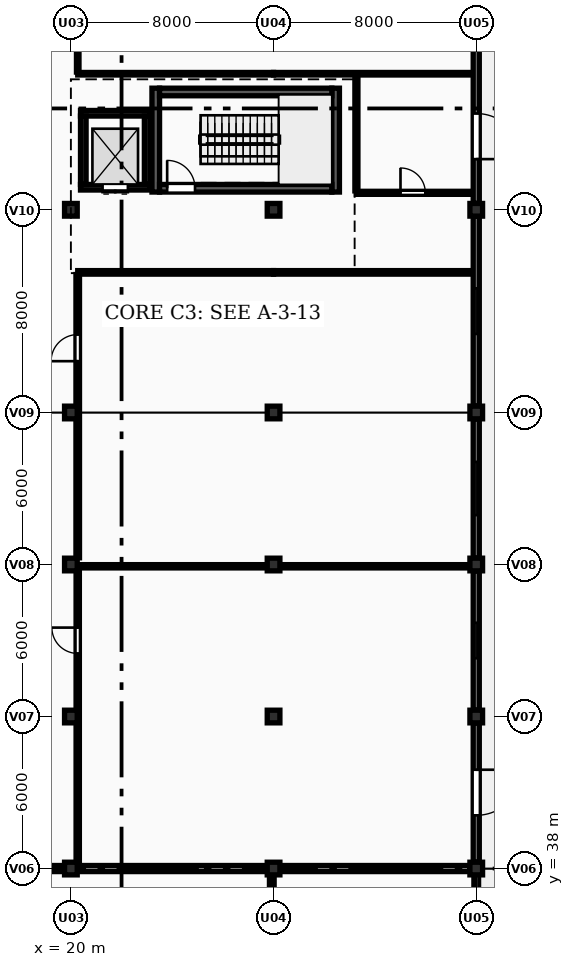
"""IFC4 building model, lengths in metres.
Left out: names, types, materials, properties, quantities, classifications, styles, units other than length and angle.
Written with IfcOpenShell. Run it as: python <this file> out.ifc"""

import sys

from ifc_helpers import new_model, si_unit, direction, frame, frame_2d, origin, origin_2d, place, context, subcontext, project, spatial, rectangle, extrude, element, fill, save


model = new_model("IFC4")
c1 = context("Model", 3, precision=1e-05, world=origin(), true_north=direction((0.0, 1.0)))
c2 = subcontext(c1, "Body", "Model", "MODEL_VIEW")
j1 = project(units=[si_unit("LENGTHUNIT", "METRE"), si_unit("PLANEANGLEUNIT", "RADIAN")], contexts=[c1])
p1 = place(None, origin())
s1 = spatial("IfcSite", under=j1, at=p1, CompositionType="ELEMENT")
p2 = place(p1, origin())
s2 = spatial("IfcBuilding", under=s1, at=p2, CompositionType="ELEMENT")
p3 = place(p2, origin())
s3 = spatial("IfcBuildingStorey", under=s2, at=p3, CompositionType="ELEMENT", Elevation=0.0)
for number, where, z_axis, x_axis in (
    (1, (20.0, 38.0, -0.2), (0.0, 0.0, 1.0), (1.0, 0.0, 0.0)),
    (2, (20.0, 44.0, -0.2), (0.0, 0.0, 1.0), (1.0, 0.0, 0.0)),
    (3, (20.0, 50.0, -0.2), (0.0, 0.0, 1.0), (1.0, 0.0, 0.0)),
    (4, (20.0, 56.0, -0.2), (0.0, 0.0, 1.0), (1.0, 0.0, 0.0)),
    (5, (20.0, 64.0, -0.2), (0.0, 0.0, 1.0), (1.0, 0.0, 0.0)),
    (6, (28.0, 38.0, -0.2), (0.0, 0.0, 1.0), (1.0, 0.0, 0.0)),
    (7, (28.0, 44.0, -0.2), (0.0, 0.0, 1.0), (1.0, 0.0, 0.0)),
    (8, (28.0, 50.0, -0.2), (0.0, 0.0, 1.0), (1.0, 0.0, 0.0)),
    (9, (28.0, 56.0, -0.2), (0.0, 0.0, 1.0), (1.0, 0.0, 0.0)),
    (10, (28.0, 64.0, -0.2), (0.0, 0.0, 1.0), (1.0, 0.0, 0.0)),
    (11, (36.0, 38.0, -0.2), (0.0, 0.0, 1.0), (1.0, 0.0, 0.0)),
    (12, (36.0, 44.0, -0.2), (0.0, 0.0, 1.0), (1.0, 0.0, 0.0)),
    (13, (36.0, 50.0, -0.2), (0.0, 0.0, 1.0), (1.0, 0.0, 0.0)),
    (14, (36.0, 56.0, -0.2), (0.0, 0.0, 1.0), (1.0, 0.0, 0.0)),
    (15, (36.0, 64.0, -0.2), (0.0, 0.0, 1.0), (1.0, 0.0, 0.0)),
):
    element("IfcColumn", number, at=place(p3, frame(where, z_axis=z_axis, x_axis=x_axis)), inside=s3, PredefinedType="COLUMN", context=c2, shape_type="SweptSolid", body=[
        extrude(rectangle(XDim=0.5, YDim=0.5, at=origin_2d()), origin(), (0.0, 0.0, 1.0), 4.7),
    ])
p4 = place(p3, frame((36.0, 71.75, 0.0), z_axis=(0.0, 0.0, 1.0), x_axis=(0.0, -1.0, 0.0)))
e16 = element("IfcWall", 16, at=p4, inside=s3, PredefinedType="SOLIDWALL", context=c2, shape_type="SweptSolid", body=[
    extrude(rectangle(XDim=7.5, YDim=0.24, at=frame_2d((3.75, 0.0))), origin(), (0.0, 0.0, 1.0), 3.59),
])
p5 = place(p4, frame((3.95, 0.0, 0.0)))
e17 = element("IfcOpeningElement", 17, at=p5, cuts=e16, PredefinedType="OPENING", context=c2, shape_type="SweptSolid", body=[
    extrude(rectangle(XDim=1.8, YDim=2.2, at=frame_2d((0.9, 1.1))), frame((0.0, 0.13, 0.0), z_axis=(0.0, -1.0, 0.0), x_axis=(1.0, 0.0, 0.0)), (0.0, 0.0, 1.0), 0.26),
])
p6 = place(p3, frame((36.0, 63.75, 0.0), z_axis=(0.0, 0.0, 1.0), x_axis=(0.0, -1.0, 0.0)))
e18 = element("IfcWall", 18, at=p6, inside=s3, PredefinedType="SOLIDWALL", context=c2, shape_type="SweptSolid", body=[
    extrude(rectangle(XDim=7.5, YDim=0.24, at=frame_2d((3.75, 0.0))), origin(), (0.0, 0.0, 1.0), 3.59),
])
p7 = place(p6, frame((2.85, 0.0, 0.95)))
e19 = element("IfcOpeningElement", 19, at=p7, cuts=e18, PredefinedType="OPENING", context=c2, shape_type="SweptSolid", body=[
    extrude(rectangle(XDim=1.8, YDim=1.2, at=frame_2d((0.9, 0.6))), frame((0.0, 0.13, 0.0), z_axis=(0.0, -1.0, 0.0), x_axis=(1.0, 0.0, 0.0)), (0.0, 0.0, 1.0), 0.26),
])
p8 = place(p3, frame((36.0, 55.75, 0.0), z_axis=(0.0, 0.0, 1.0), x_axis=(0.0, -1.0, 0.0)))
e20 = element("IfcWall", 20, at=p8, inside=s3, PredefinedType="SOLIDWALL", context=c2, shape_type="SweptSolid", body=[
    extrude(rectangle(XDim=5.5, YDim=0.24, at=frame_2d((2.75, 0.0))), origin(), (0.0, 0.0, 1.0), 3.59),
])
p9 = place(p8, frame((1.7, 0.0, 0.95)))
e21 = element("IfcOpeningElement", 21, at=p9, cuts=e20, PredefinedType="OPENING", context=c2, shape_type="SweptSolid", body=[
    extrude(rectangle(XDim=2.1, YDim=1.2, at=frame_2d((1.05, 0.6))), frame((0.0, 0.13, 0.0), z_axis=(0.0, -1.0, 0.0), x_axis=(1.0, 0.0, 0.0)), (0.0, 0.0, 1.0), 0.26),
])
p10 = place(p3, frame((36.0, 49.75, 0.0), z_axis=(0.0, 0.0, 1.0), x_axis=(0.0, -1.0, 0.0)))
e22 = element("IfcWall", 22, at=p10, inside=s3, PredefinedType="SOLIDWALL", context=c2, shape_type="SweptSolid", body=[
    extrude(rectangle(XDim=5.5, YDim=0.24, at=frame_2d((2.75, 0.0))), origin(), (0.0, 0.0, 1.0), 3.59),
])
p11 = place(p10, frame((2.05, 0.0, 0.95)))
e23 = element("IfcOpeningElement", 23, at=p11, cuts=e22, PredefinedType="OPENING", context=c2, shape_type="SweptSolid", body=[
    extrude(rectangle(XDim=1.4, YDim=1.8, at=frame_2d((0.7, 0.9))), frame((0.0, 0.13, 0.0), z_axis=(0.0, -1.0, 0.0), x_axis=(1.0, 0.0, 0.0)), (0.0, 0.0, 1.0), 0.26),
])
p12 = place(p3, frame((36.0, 43.75, 0.0), z_axis=(0.0, 0.0, 1.0), x_axis=(0.0, -1.0, 0.0)))
e24 = element("IfcWall", 24, at=p12, inside=s3, PredefinedType="SOLIDWALL", context=c2, shape_type="SweptSolid", body=[
    extrude(rectangle(XDim=5.5, YDim=0.24, at=frame_2d((2.75, 0.0))), origin(), (0.0, 0.0, 1.0), 3.59),
])
p13 = place(p12, frame((1.85, 0.0, 0.0)))
e25 = element("IfcOpeningElement", 25, at=p13, cuts=e24, PredefinedType="OPENING", context=c2, shape_type="SweptSolid", body=[
    extrude(rectangle(XDim=1.8, YDim=2.2, at=frame_2d((0.9, 1.1))), frame((0.0, 0.13, 0.0), z_axis=(0.0, -1.0, 0.0), x_axis=(1.0, 0.0, 0.0)), (0.0, 0.0, 1.0), 0.26),
])
p14 = place(p3, frame((35.75, 38.0, 0.0), z_axis=(0.0, 0.0, 1.0), x_axis=(-1.0, 0.0, 0.0)))
e26 = element("IfcWall", 26, at=p14, inside=s3, PredefinedType="SOLIDWALL", context=c2, shape_type="SweptSolid", body=[
    extrude(rectangle(XDim=7.5, YDim=0.24, at=frame_2d((3.75, 0.0))), origin(), (0.0, 0.0, 1.0), 3.59),
])
p15 = place(p14, frame((2.9, 0.0, 0.95)))
e27 = element("IfcOpeningElement", 27, at=p15, cuts=e26, PredefinedType="OPENING", context=c2, shape_type="SweptSolid", body=[
    extrude(rectangle(XDim=1.7, YDim=1.8, at=frame_2d((0.85, 0.9))), frame((0.0, 0.13, 0.0), z_axis=(0.0, -1.0, 0.0), x_axis=(1.0, 0.0, 0.0)), (0.0, 0.0, 1.0), 0.26),
])
p16 = place(p3, frame((27.75, 38.0, 0.0), z_axis=(0.0, 0.0, 1.0), x_axis=(-1.0, 0.0, 0.0)))
e28 = element("IfcWall", 28, at=p16, inside=s3, PredefinedType="SOLIDWALL", context=c2, shape_type="SweptSolid", body=[
    extrude(rectangle(XDim=7.5, YDim=0.24, at=frame_2d((3.75, 0.0))), origin(), (0.0, 0.0, 1.0), 3.59),
])
p17 = place(p16, frame((2.75, 0.0, 0.95)))
e29 = element("IfcOpeningElement", 29, at=p17, cuts=e28, PredefinedType="OPENING", context=c2, shape_type="SweptSolid", body=[
    extrude(rectangle(XDim=2.0, YDim=1.8, at=frame_2d((1.0, 0.9))), frame((0.0, 0.13, 0.0), z_axis=(0.0, -1.0, 0.0), x_axis=(1.0, 0.0, 0.0)), (0.0, 0.0, 1.0), 0.26),
])
p18 = place(p3, frame((19.75, 38.0, 0.0), z_axis=(0.0, 0.0, 1.0), x_axis=(-1.0, 0.0, 0.0)))
e30 = element("IfcWall", 30, at=p18, inside=s3, PredefinedType="SOLIDWALL", context=c2, shape_type="SweptSolid", body=[
    extrude(rectangle(XDim=7.5, YDim=0.24, at=frame_2d((3.75, 0.0))), origin(), (0.0, 0.0, 1.0), 3.59),
])
p19 = place(p3, frame((36.0, 37.75, 0.0), z_axis=(0.0, 0.0, 1.0), x_axis=(0.0, -1.0, 0.0)))
e31 = element("IfcWall", 31, at=p19, inside=s3, PredefinedType="SOLIDWALL", context=c2, shape_type="SweptSolid", body=[
    extrude(rectangle(XDim=5.5, YDim=0.185, at=frame_2d((2.75, 0.0))), origin(), (0.0, 0.0, 1.0), 0.95),
])
for number, where, z_axis, x_axis in (
    (32, (23.35, 64.7, 0.0), (0.0, 0.0, 1.0), (0.0, 1.0, 0.0)),
    (33, (30.45, 68.8, 0.0), (0.0, 0.0, 1.0), (0.0, -1.0, 0.0)),
):
    element("IfcWall", number, at=place(p3, frame(where, z_axis=z_axis, x_axis=x_axis)), inside=s3, PredefinedType="SHEAR", context=c2, shape_type="SweptSolid", body=[
        extrude(rectangle(XDim=4.1, YDim=0.3, at=frame_2d((2.05, 0.0))), origin(), (0.0, 0.0, 1.0), 4.24),
    ])
p20 = place(p3, frame((23.5, 64.85, 0.0), z_axis=(0.0, 0.0, 1.0), x_axis=(1.0, 0.0, 0.0)))
e34 = element("IfcWall", 34, at=p20, inside=s3, PredefinedType="SHEAR", context=c2, shape_type="SweptSolid", body=[
    extrude(rectangle(XDim=6.8, YDim=0.3, at=frame_2d((3.4, 0.0))), origin(), (0.0, 0.0, 1.0), 4.24),
])
p21 = place(p20, frame((0.3, 0.0, 0.0)))
e35 = element("IfcOpeningElement", 35, at=p21, cuts=e34, PredefinedType="OPENING", context=c2, shape_type="SweptSolid", body=[
    extrude(rectangle(XDim=1.1, YDim=2.15, at=frame_2d((0.55, 1.075))), frame((0.0, 0.16, 0.0), z_axis=(0.0, -1.0, 0.0), x_axis=(1.0, 0.0, 0.0)), (0.0, 0.0, 1.0), 0.32),
])
p22 = place(p3, frame((30.3, 68.65, 0.0), z_axis=(0.0, 0.0, 1.0), x_axis=(-1.0, 0.0, 0.0)))
e36 = element("IfcWall", 36, at=p22, inside=s3, PredefinedType="SHEAR", context=c2, shape_type="SweptSolid", body=[
    extrude(rectangle(XDim=6.8, YDim=0.3, at=frame_2d((3.4, 0.0))), origin(), (0.0, 0.0, 1.0), 4.24),
])
p23 = place(p3, frame((23.12, 64.89, 0.0), z_axis=(0.0, 0.0, 1.0), x_axis=(-1.0, 0.0, 0.0)))
e37 = element("IfcWall", 37, at=p23, inside=s3, PredefinedType="SHEAR", context=c2, shape_type="SweptSolid", body=[
    extrude(rectangle(XDim=2.74, YDim=0.22, at=frame_2d((1.37, 0.0))), origin(), (0.0, 0.0, 1.0), 4.24),
])
p24 = place(p23, frame((0.87, 0.0, 0.0)))
e38 = element("IfcOpeningElement", 38, at=p24, cuts=e37, PredefinedType="OPENING", context=c2, shape_type="SweptSolid", body=[
    extrude(rectangle(XDim=1.0, YDim=2.15, at=frame_2d((0.5, 1.075))), frame((0.0, 0.12, 0.0), z_axis=(0.0, -1.0, 0.0), x_axis=(1.0, 0.0, 0.0)), (0.0, 0.0, 1.0), 0.24),
])
p25 = place(p3, frame((20.38, 67.81, 0.0), z_axis=(0.0, 0.0, 1.0), x_axis=(1.0, 0.0, 0.0)))
e39 = element("IfcWall", 39, at=p25, inside=s3, PredefinedType="SHEAR", context=c2, shape_type="SweptSolid", body=[
    extrude(rectangle(XDim=2.74, YDim=0.22, at=frame_2d((1.37, 0.0))), origin(), (0.0, 0.0, 1.0), 4.24),
])
for number, where, z_axis, x_axis in (
    (40, (20.49, 65.0, 0.0), (0.0, 0.0, 1.0), (0.0, 1.0, 0.0)),
    (41, (23.01, 67.7, 0.0), (0.0, 0.0, 1.0), (0.0, -1.0, 0.0)),
):
    element("IfcWall", number, at=place(p3, frame(where, z_axis=z_axis, x_axis=x_axis)), inside=s3, PredefinedType="SHEAR", context=c2, shape_type="SweptSolid", body=[
        extrude(rectangle(XDim=2.7, YDim=0.22, at=frame_2d((1.35, 0.0))), origin(), (0.0, 0.0, 1.0), 4.24),
    ])
p26 = place(p3, frame((20.27, 69.37, 0.0), z_axis=(0.0, 0.0, 1.0), x_axis=(1.0, 0.0, 0.0)))
e42 = element("IfcWall", 42, at=p26, inside=s3, PredefinedType="PARTITIONING", context=c2, shape_type="SweptSolid", body=[
    extrude(rectangle(XDim=7.73, YDim=0.1, at=frame_2d((3.865, 0.0))), origin(), (0.0, 0.0, 1.0), 4.24),
])
p27 = place(p3, frame((28.0, 69.37, 0.0), z_axis=(0.0, 0.0, 1.0), x_axis=(1.0, 0.0, 0.0)))
e43 = element("IfcWall", 43, at=p27, inside=s3, PredefinedType="PARTITIONING", context=c2, shape_type="SweptSolid", body=[
    extrude(rectangle(XDim=7.838, YDim=0.1, at=frame_2d((3.919, 0.0))), origin(), (0.0, 0.0, 1.0), 4.24),
])
p28 = place(p3, frame((20.27, 69.435, 0.0), z_axis=(0.0, 0.0, 1.0), x_axis=(0.0, 1.0, 0.0)))
e44 = element("IfcWall", 44, at=p28, inside=s3, PredefinedType="PARTITIONING", context=c2, shape_type="SweptSolid", body=[
    extrude(rectangle(XDim=2.3, YDim=0.1, at=frame_2d((1.15, 0.0))), origin(), (0.0, 0.0, 1.0), 3.59),
])
p29 = place(p3, frame((31.27, 64.67, 0.0), z_axis=(0.0, 0.0, 1.0), x_axis=(1.0, 0.0, 0.0)))
e45 = element("IfcWall", 45, at=p29, inside=s3, PredefinedType="PARTITIONING", context=c2, shape_type="SweptSolid", body=[
    extrude(rectangle(XDim=4.568, YDim=0.12, at=frame_2d((2.284, 0.0))), origin(), (0.0, 0.0, 1.0), 4.24),
])
p30 = place(p29, frame((1.74, 0.0, 0.0)))
e46 = element("IfcOpeningElement", 46, at=p30, cuts=e45, PredefinedType="OPENING", context=c2, shape_type="SweptSolid", body=[
    extrude(rectangle(XDim=0.98, YDim=2.1, at=frame_2d((0.49, 1.05))), frame((0.0, 0.07, 0.0), z_axis=(0.0, -1.0, 0.0), x_axis=(1.0, 0.0, 0.0)), (0.0, 0.0, 1.0), 0.14),
])
p31 = place(p3, frame((31.27, 64.745, 0.0), z_axis=(0.0, 0.0, 1.0), x_axis=(0.0, 1.0, 0.0)))
e47 = element("IfcWall", 47, at=p31, inside=s3, PredefinedType="PARTITIONING", context=c2, shape_type="SweptSolid", body=[
    extrude(rectangle(XDim=4.485, YDim=0.12, at=frame_2d((2.242, 0.0))), origin(), (0.0, 0.0, 1.0), 4.24),
])
for number, where, z_axis, x_axis in (
    (48, (20.27, 49.93, 0.0), (0.0, 0.0, 1.0), (1.0, 0.0, 0.0)),
    (49, (28.265, 49.93, 0.0), (0.0, 0.0, 1.0), (1.0, 0.0, 0.0)),
):
    element("IfcWall", number, at=place(p3, frame(where, z_axis=z_axis, x_axis=x_axis)), inside=s3, PredefinedType="PARTITIONING", context=c2, shape_type="SweptSolid", body=[
        extrude(rectangle(XDim=7.465, YDim=0.13, at=frame_2d((3.732, 0.0))), origin(), (0.0, 0.0, 1.0), 3.59),
    ])
p32 = place(p3, frame((20.27, 38.265, 0.0), z_axis=(0.0, 0.0, 1.0), x_axis=(0.0, 1.0, 0.0)))
e50 = element("IfcWall", 50, at=p32, inside=s3, PredefinedType="PARTITIONING", context=c2, shape_type="SweptSolid", body=[
    extrude(rectangle(XDim=11.47, YDim=0.13, at=frame_2d((5.735, 0.0))), origin(), (0.0, 0.0, 1.0), 3.59),
])
p33 = place(p32, frame((8.225, 0.0, 0.0)))
e51 = element("IfcOpeningElement", 51, at=p33, cuts=e50, PredefinedType="OPENING", context=c2, shape_type="SweptSolid", body=[
    extrude(rectangle(XDim=1.02, YDim=2.1, at=frame_2d((0.51, 1.05))), frame((0.0, 0.075, 0.0), z_axis=(0.0, -1.0, 0.0), x_axis=(1.0, 0.0, 0.0)), (0.0, 0.0, 1.0), 0.15),
])
p34 = place(p3, frame((20.27, 61.53, 0.0), z_axis=(0.0, 0.0, 1.0), x_axis=(1.0, 0.0, 0.0)))
e52 = element("IfcWall", 52, at=p34, inside=s3, PredefinedType="PARTITIONING", context=c2, shape_type="SweptSolid", body=[
    extrude(rectangle(XDim=7.73, YDim=0.14, at=frame_2d((3.865, 0.0))), origin(), (0.0, 0.0, 1.0), 4.24),
])
p35 = place(p3, frame((28.0, 61.53, 0.0), z_axis=(0.0, 0.0, 1.0), x_axis=(1.0, 0.0, 0.0)))
e53 = element("IfcWall", 53, at=p35, inside=s3, PredefinedType="PARTITIONING", context=c2, shape_type="SweptSolid", body=[
    extrude(rectangle(XDim=7.838, YDim=0.14, at=frame_2d((3.919, 0.0))), origin(), (0.0, 0.0, 1.0), 4.24),
])
p36 = place(p3, frame((20.27, 50.265, 0.0), z_axis=(0.0, 0.0, 1.0), x_axis=(0.0, 1.0, 0.0)))
e54 = element("IfcWall", 54, at=p36, inside=s3, PredefinedType="PARTITIONING", context=c2, shape_type="SweptSolid", body=[
    extrude(rectangle(XDim=11.18, YDim=0.14, at=frame_2d((5.59, 0.0))), origin(), (0.0, 0.0, 1.0), 3.59),
])
p37 = place(p36, frame((7.76, 0.0, 0.0)))
e55 = element("IfcOpeningElement", 55, at=p37, cuts=e54, PredefinedType="OPENING", context=c2, shape_type="SweptSolid", body=[
    extrude(rectangle(XDim=1.05, YDim=2.1, at=frame_2d((0.525, 1.05))), frame((0.0, 0.08, 0.0), z_axis=(0.0, -1.0, 0.0), x_axis=(1.0, 0.0, 0.0)), (0.0, 0.0, 1.0), 0.16),
])
p38 = place(p3, frame((27.93, 32.265, 0.0), z_axis=(0.0, 0.0, 1.0), x_axis=(0.0, 1.0, 0.0)))
e56 = element("IfcWall", 56, at=p38, inside=s3, PredefinedType="PARTITIONING", context=c2, shape_type="SweptSolid", body=[
    extrude(rectangle(XDim=5.465, YDim=0.185, at=frame_2d((2.732, 0.0))), origin(), (0.0, 0.0, 1.0), 3.59),
])
p39 = place(p5, origin())
e57 = element("IfcDoor", 57, at=p39, inside=s3, OperationType="SINGLE_SWING_RIGHT", PredefinedType="DOOR", context=c2, shape_type="SweptSolid", body=[
    extrude(rectangle(XDim=1.8, YDim=2.2, at=frame_2d((0.9, 1.1))), frame((0.0, 0.025, 0.0), z_axis=(0.0, -1.0, 0.0), x_axis=(1.0, 0.0, 0.0)), (0.0, 0.0, 1.0), 0.05),
])
fill(e17, e57)
p40 = place(p7, origin())
e58 = element("IfcWindow", 58, at=p40, inside=s3, PartitioningType="DOUBLE_PANEL_VERTICAL", PredefinedType="WINDOW", context=c2, shape_type="SweptSolid", body=[
    extrude(rectangle(XDim=1.8, YDim=1.2, at=frame_2d((0.9, 0.6))), frame((0.0, 0.03, 0.0), z_axis=(0.0, -1.0, 0.0), x_axis=(1.0, 0.0, 0.0)), (0.0, 0.0, 1.0), 0.06),
])
fill(e19, e58)
p41 = place(p9, origin())
e59 = element("IfcWindow", 59, at=p41, inside=s3, PartitioningType="DOUBLE_PANEL_VERTICAL", PredefinedType="WINDOW", context=c2, shape_type="SweptSolid", body=[
    extrude(rectangle(XDim=2.1, YDim=1.2, at=frame_2d((1.05, 0.6))), frame((0.0, 0.03, 0.0), z_axis=(0.0, -1.0, 0.0), x_axis=(1.0, 0.0, 0.0)), (0.0, 0.0, 1.0), 0.06),
])
fill(e21, e59)
p42 = place(p11, origin())
e60 = element("IfcWindow", 60, at=p42, inside=s3, PartitioningType="SINGLE_PANEL", PredefinedType="WINDOW", context=c2, shape_type="SweptSolid", body=[
    extrude(rectangle(XDim=1.4, YDim=1.8, at=frame_2d((0.7, 0.9))), frame((0.0, 0.03, 0.0), z_axis=(0.0, -1.0, 0.0), x_axis=(1.0, 0.0, 0.0)), (0.0, 0.0, 1.0), 0.06),
])
fill(e23, e60)
p43 = place(p13, origin())
e61 = element("IfcDoor", 61, at=p43, inside=s3, OperationType="SINGLE_SWING_LEFT", PredefinedType="DOOR", context=c2, shape_type="SweptSolid", body=[
    extrude(rectangle(XDim=1.8, YDim=2.2, at=frame_2d((0.9, 1.1))), frame((0.0, 0.025, 0.0), z_axis=(0.0, -1.0, 0.0), x_axis=(1.0, 0.0, 0.0)), (0.0, 0.0, 1.0), 0.05),
])
fill(e25, e61)
p44 = place(p15, origin())
e62 = element("IfcWindow", 62, at=p44, inside=s3, PartitioningType="DOUBLE_PANEL_VERTICAL", PredefinedType="WINDOW", context=c2, shape_type="SweptSolid", body=[
    extrude(rectangle(XDim=1.7, YDim=1.8, at=frame_2d((0.85, 0.9))), frame((0.0, 0.03, 0.0), z_axis=(0.0, -1.0, 0.0), x_axis=(1.0, 0.0, 0.0)), (0.0, 0.0, 1.0), 0.06),
])
fill(e27, e62)
p45 = place(p17, origin())
e63 = element("IfcWindow", 63, at=p45, inside=s3, PartitioningType="DOUBLE_PANEL_VERTICAL", PredefinedType="WINDOW", context=c2, shape_type="SweptSolid", body=[
    extrude(rectangle(XDim=2.0, YDim=1.8, at=frame_2d((1.0, 0.9))), frame((0.0, 0.03, 0.0), z_axis=(0.0, -1.0, 0.0), x_axis=(1.0, 0.0, 0.0)), (0.0, 0.0, 1.0), 0.06),
])
fill(e29, e63)
p46 = place(p21, origin())
e64 = element("IfcDoor", 64, at=p46, inside=s3, OperationType="SINGLE_SWING_LEFT", PredefinedType="DOOR", context=c2, shape_type="SweptSolid", body=[
    extrude(rectangle(XDim=1.1, YDim=2.15, at=frame_2d((0.55, 1.075))), frame((0.0, 0.025, 0.0), z_axis=(0.0, -1.0, 0.0), x_axis=(1.0, 0.0, 0.0)), (0.0, 0.0, 1.0), 0.05),
])
fill(e35, e64)
p47 = place(p24, origin())
e65 = element("IfcDoor", 65, at=p47, inside=s3, OperationType="DOUBLE_DOOR_SLIDING", PredefinedType="DOOR", context=c2, shape_type="SweptSolid", body=[
    extrude(rectangle(XDim=1.0, YDim=2.15, at=frame_2d((0.5, 1.075))), frame((0.0, 0.025, 0.0), z_axis=(0.0, -1.0, 0.0), x_axis=(1.0, 0.0, 0.0)), (0.0, 0.0, 1.0), 0.05),
])
fill(e38, e65)
p48 = place(p30, origin())
e66 = element("IfcDoor", 66, at=p48, inside=s3, OperationType="SINGLE_SWING_LEFT", PredefinedType="DOOR", context=c2, shape_type="SweptSolid", body=[
    extrude(rectangle(XDim=0.98, YDim=2.1, at=frame_2d((0.49, 1.05))), frame((0.0, 0.025, 0.0), z_axis=(0.0, -1.0, 0.0), x_axis=(1.0, 0.0, 0.0)), (0.0, 0.0, 1.0), 0.05),
])
fill(e46, e66)
p49 = place(p33, origin())
e67 = element("IfcDoor", 67, at=p49, inside=s3, OperationType="SINGLE_SWING_RIGHT", PredefinedType="DOOR", context=c2, shape_type="SweptSolid", body=[
    extrude(rectangle(XDim=1.02, YDim=2.1, at=frame_2d((0.51, 1.05))), frame((0.0, 0.025, 0.0), z_axis=(0.0, -1.0, 0.0), x_axis=(1.0, 0.0, 0.0)), (0.0, 0.0, 1.0), 0.05),
])
fill(e51, e67)
p50 = place(p37, origin())
e68 = element("IfcDoor", 68, at=p50, inside=s3, OperationType="SINGLE_SWING_LEFT", PredefinedType="DOOR", context=c2, shape_type="SweptSolid", body=[
    extrude(rectangle(XDim=1.05, YDim=2.1, at=frame_2d((0.525, 1.05))), frame((0.0, 0.025, 0.0), z_axis=(0.0, -1.0, 0.0), x_axis=(1.0, 0.0, 0.0)), (0.0, 0.0, 1.0), 0.05),
])
fill(e55, e68)
save(model, sys.argv[1])
